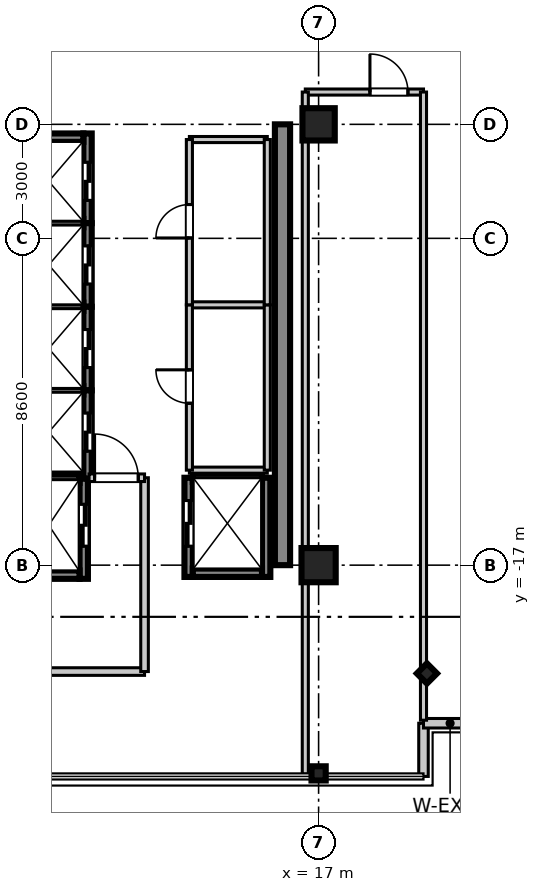
"""IFC4 building model, lengths in metres.
Left out: names, types, materials, properties, quantities, classifications, styles, units other than length and angle.
Written with IfcOpenShell. Run it as: python <this file> out.ifc"""

import sys

from ifc_helpers import new_model, si_unit, direction, frame, frame_2d, origin, origin_2d, place, context, subcontext, project, spatial, rectangle, i_section, extrude, source, transform, mapped, element, fill, save


model = new_model("IFC4")
c1 = context("Model", 3, precision=1e-05, world=origin(), true_north=direction((0.0, 1.0)))
c2 = subcontext(c1, "Body", "Model", "MODEL_VIEW")
j1 = project(units=[si_unit("LENGTHUNIT", "METRE"), si_unit("PLANEANGLEUNIT", "RADIAN")], contexts=[c1])
p1 = place(None, origin())
s1 = spatial("IfcSite", under=j1, at=p1, CompositionType="ELEMENT")
p2 = place(p1, origin())
s2 = spatial("IfcBuilding", under=s1, at=p2, CompositionType="ELEMENT")
p3 = place(p2, frame((0.0, 0.0, 311.9)))
s3 = spatial("IfcBuildingStorey", under=s2, at=p3, CompositionType="ELEMENT", Elevation=311.9)
m1 = source(origin(), c2, "Body", "SweptSolid", [
    extrude(rectangle(XDim=0.9, YDim=0.9, at=origin_2d()), origin(), (0.0, 0.0, 1.0), 3.805),
])
p4 = place(p3, frame((17.0, -17.0, 0.0), z_axis=(0.0, 0.0, 1.0), x_axis=(1.0, 0.0, 0.0)))
e1 = element("IfcColumn", 1, at=p4, inside=s3, PredefinedType="COLUMN", context=c2, shape_type="MappedRepresentation", body=[
    mapped(m1, transform((0.0, 0.0, 0.0), scale=1.0)),
])
m2 = source(origin(), c2, "Body", "SweptSolid", [
    extrude(rectangle(XDim=0.85, YDim=0.85, at=origin_2d()), origin(), (0.0, 0.0, 1.0), 3.805),
])
p5 = place(p3, frame((17.0, -5.4, 0.0), z_axis=(0.0, 0.0, 1.0), x_axis=(1.0, 0.0, 0.0)))
e2 = element("IfcColumn", 2, at=p5, inside=s3, PredefinedType="PILASTER", context=c2, shape_type="MappedRepresentation", body=[
    mapped(m2, transform((0.0, 0.0, 0.0), scale=1.0)),
])
m3 = source(origin(), c2, "Body", "SweptSolid", [
    extrude(i_section(OverallWidth=0.374, OverallDepth=0.374, WebThickness=0.014, FlangeThickness=0.023, at=origin_2d()), origin(), (0.0, 0.0, 1.0), 3.805),
])
for number, where, z_axis, x_axis in (
    (3, (17.0, -22.48, 0.0), (0.0, 0.0, 1.0), (0.0, 1.0, 0.0)),
    (4, (19.85, -19.85, 0.0), (0.0, 0.0, 1.0), (0.707, 0.707, 0.0)),
):
    element("IfcColumn", number, at=place(p3, frame(where, z_axis=z_axis, x_axis=x_axis)), inside=s3, PredefinedType="COLUMN", context=c2, shape_type="MappedRepresentation", body=[
        mapped(m3, transform((0.0, 0.0, 0.0), scale=1.0)),
    ])
m4 = source(origin(), c2, "Body", "SweptSolid", [
    extrude(rectangle(XDim=11.6, YDim=0.4, at=frame_2d((5.8, 0.0))), origin(), (0.0, 0.0, 1.0), 3.55),
])
p6 = place(p3, frame((16.05, -17.0, 0.0), z_axis=(0.0, 0.0, 1.0), x_axis=(0.0, 1.0, 0.0)))
e5 = element("IfcWall", 5, at=p6, inside=s3, PredefinedType="SHEAR", context=c2, shape_type="MappedRepresentation", body=[
    mapped(m4, transform((0.0, 0.0, 0.0), scale=1.0)),
])
m5 = source(origin(), c2, "Body", "SweptSolid", [
    extrude(rectangle(XDim=2.36, YDim=0.22, at=frame_2d((1.18, 0.0))), origin(), (0.0, 0.0, 1.0), 3.55),
])
p7 = place(p3, frame((10.92, -8.0, 0.0), z_axis=(0.0, 0.0, 1.0), x_axis=(0.0, 1.0, 0.0)))
e6 = element("IfcWall", 6, at=p7, inside=s3, PredefinedType="SHEAR", context=c2, shape_type="MappedRepresentation", body=[
    mapped(m5, transform((0.0, 0.0, 0.0), scale=1.0)),
])
p8 = place(p7, frame((0.6, 0.0, 0.0)))
e7 = element("IfcOpeningElement", 7, at=p8, cuts=e6, PredefinedType="OPENING", context=c2, shape_type="SweptSolid", body=[
    extrude(rectangle(XDim=1.0, YDim=2.2, at=frame_2d((0.5, 1.1))), frame((0.0, 0.12, 0.0), z_axis=(0.0, -1.0, 0.0), x_axis=(1.0, 0.0, 0.0)), (0.0, 0.0, 1.0), 0.24),
])
m6 = source(origin(), c2, "Body", "SweptSolid", [
    extrude(rectangle(XDim=1.82, YDim=0.22, at=frame_2d((0.91, 0.0))), origin(), (0.0, 0.0, 1.0), 3.55),
])
p9 = place(p3, frame((8.99, -5.75, 0.0), z_axis=(0.0, 0.0, 1.0), x_axis=(1.0, 0.0, 0.0)))
e8 = element("IfcWall", 8, at=p9, inside=s3, PredefinedType="SHEAR", context=c2, shape_type="MappedRepresentation", body=[
    mapped(m6, transform((0.0, 0.0, 0.0), scale=1.0)),
])
m7 = source(origin(), c2, "Body", "SweptSolid", [
    extrude(rectangle(XDim=2.2, YDim=0.22, at=frame_2d((1.1, 0.0))), origin(), (0.0, 0.0, 1.0), 3.55),
])
p10 = place(p3, frame((10.92, -10.2, 0.0), z_axis=(0.0, 0.0, 1.0), x_axis=(0.0, 1.0, 0.0)))
e9 = element("IfcWall", 9, at=p10, inside=s3, PredefinedType="SHEAR", context=c2, shape_type="MappedRepresentation", body=[
    mapped(m7, transform((0.0, 0.0, 0.0), scale=1.0)),
])
p11 = place(p10, frame((0.6, 0.0, 0.0)))
e10 = element("IfcOpeningElement", 10, at=p11, cuts=e9, PredefinedType="OPENING", context=c2, shape_type="SweptSolid", body=[
    extrude(rectangle(XDim=1.0, YDim=2.2, at=frame_2d((0.5, 1.1))), frame((0.0, 0.12, 0.0), z_axis=(0.0, -1.0, 0.0), x_axis=(1.0, 0.0, 0.0)), (0.0, 0.0, 1.0), 0.24),
])
m8 = source(origin(), c2, "Body", "SweptSolid", [
    extrude(rectangle(XDim=1.82, YDim=0.22, at=frame_2d((0.91, 0.0))), origin(), (0.0, 0.0, 1.0), 3.85),
])
p12 = place(p3, frame((8.99, -8.0, 0.0), z_axis=(0.0, 0.0, 1.0), x_axis=(1.0, 0.0, 0.0)))
e11 = element("IfcWall", 11, at=p12, inside=s3, PredefinedType="SHEAR", context=c2, shape_type="MappedRepresentation", body=[
    mapped(m8, transform((0.0, 0.0, 0.0), scale=1.0)),
])
p13 = place(p3, frame((10.92, -12.4, 0.0), z_axis=(0.0, 0.0, 1.0), x_axis=(0.0, 1.0, 0.0)))
e12 = element("IfcWall", 12, at=p13, inside=s3, PredefinedType="SHEAR", context=c2, shape_type="MappedRepresentation", body=[
    mapped(m7, transform((0.0, 0.0, 0.0), scale=1.0)),
])
p14 = place(p13, frame((0.6, 0.0, 0.0)))
e13 = element("IfcOpeningElement", 13, at=p14, cuts=e12, PredefinedType="OPENING", context=c2, shape_type="SweptSolid", body=[
    extrude(rectangle(XDim=1.0, YDim=2.2, at=frame_2d((0.5, 1.1))), frame((0.0, 0.12, 0.0), z_axis=(0.0, -1.0, 0.0), x_axis=(1.0, 0.0, 0.0)), (0.0, 0.0, 1.0), 0.24),
])
p15 = place(p3, frame((8.99, -10.2, 0.0), z_axis=(0.0, 0.0, 1.0), x_axis=(1.0, 0.0, 0.0)))
e14 = element("IfcWall", 14, at=p15, inside=s3, PredefinedType="SHEAR", context=c2, shape_type="MappedRepresentation", body=[
    mapped(m8, transform((0.0, 0.0, 0.0), scale=1.0)),
])
m9 = source(origin(), c2, "Body", "SweptSolid", [
    extrude(rectangle(XDim=2.325, YDim=0.22, at=frame_2d((1.163, 0.0))), origin(), (0.0, 0.0, 1.0), 3.55),
])
p16 = place(p3, frame((10.92, -14.725, 0.0), z_axis=(0.0, 0.0, 1.0), x_axis=(0.0, 1.0, 0.0)))
e15 = element("IfcWall", 15, at=p16, inside=s3, PredefinedType="SHEAR", context=c2, shape_type="MappedRepresentation", body=[
    mapped(m9, transform((0.0, 0.0, 0.0), scale=1.0)),
])
p17 = place(p16, frame((0.725, 0.0, 0.0)))
e16 = element("IfcOpeningElement", 16, at=p17, cuts=e15, PredefinedType="OPENING", context=c2, shape_type="SweptSolid", body=[
    extrude(rectangle(XDim=1.0, YDim=2.2, at=frame_2d((0.5, 1.1))), frame((0.0, 0.12, 0.0), z_axis=(0.0, -1.0, 0.0), x_axis=(1.0, 0.0, 0.0)), (0.0, 0.0, 1.0), 0.24),
])
p18 = place(p3, frame((8.99, -12.4, 0.0), z_axis=(0.0, 0.0, 1.0), x_axis=(1.0, 0.0, 0.0)))
e17 = element("IfcWall", 17, at=p18, inside=s3, PredefinedType="SHEAR", context=c2, shape_type="MappedRepresentation", body=[
    mapped(m8, transform((0.0, 0.0, 0.0), scale=1.0)),
])
m10 = source(origin(), c2, "Body", "SweptSolid", [
    extrude(rectangle(XDim=2.635, YDim=0.22, at=frame_2d((1.317, 0.0))), origin(), (0.0, 0.0, 1.0), 3.55),
])
p19 = place(p3, frame((10.82, -17.36, 0.0), z_axis=(0.0, 0.0, 1.0), x_axis=(0.0, 1.0, 0.0)))
e18 = element("IfcWall", 18, at=p19, inside=s3, PredefinedType="SHEAR", context=c2, shape_type="MappedRepresentation", body=[
    mapped(m10, transform((0.0, 0.0, 0.0), scale=1.0)),
])
p20 = place(p19, frame((0.86, 0.0, 0.0)))
e19 = element("IfcOpeningElement", 19, at=p20, cuts=e18, PredefinedType="OPENING", context=c2, shape_type="SweptSolid", body=[
    extrude(rectangle(XDim=1.1, YDim=2.2, at=frame_2d((0.55, 1.1))), frame((0.0, 0.12, 0.0), z_axis=(0.0, -1.0, 0.0), x_axis=(1.0, 0.0, 0.0)), (0.0, 0.0, 1.0), 0.24),
])
m11 = source(origin(), c2, "Body", "SweptSolid", [
    extrude(rectangle(XDim=1.62, YDim=0.22, at=frame_2d((0.81, 0.0))), origin(), (0.0, 0.0, 1.0), 3.55),
])
p21 = place(p3, frame((9.09, -17.25, 0.0), z_axis=(0.0, 0.0, 1.0), x_axis=(1.0, 0.0, 0.0)))
e20 = element("IfcWall", 20, at=p21, inside=s3, PredefinedType="SHEAR", context=c2, shape_type="MappedRepresentation", body=[
    mapped(m11, transform((0.0, 0.0, 0.0), scale=1.0)),
])
m12 = source(origin(), c2, "Body", "SweptSolid", [
    extrude(rectangle(XDim=1.62, YDim=0.22, at=frame_2d((0.81, 0.0))), origin(), (0.0, 0.0, 1.0), 3.85),
])
p22 = place(p3, frame((9.09, -14.725, 0.0), z_axis=(0.0, 0.0, 1.0), x_axis=(1.0, 0.0, 0.0)))
e21 = element("IfcWall", 21, at=p22, inside=s3, PredefinedType="SHEAR", context=c2, shape_type="MappedRepresentation", body=[
    mapped(m12, transform((0.0, 0.0, 0.0), scale=1.0)),
])
m13 = source(origin(), c2, "Body", "SweptSolid", [
    extrude(rectangle(XDim=2.61, YDim=0.22, at=frame_2d((1.305, 0.0))), origin(), (0.0, 0.0, 1.0), 3.55),
])
p23 = place(p3, frame((13.58, -17.31, 0.0), z_axis=(0.0, 0.0, 1.0), x_axis=(0.0, 1.0, 0.0)))
e22 = element("IfcWall", 22, at=p23, inside=s3, PredefinedType="SHEAR", context=c2, shape_type="MappedRepresentation", body=[
    mapped(m13, transform((0.0, 0.0, 0.0), scale=1.0)),
])
p24 = place(p23, frame((0.81, 0.0, 0.0)))
e23 = element("IfcOpeningElement", 23, at=p24, cuts=e22, PredefinedType="OPENING", context=c2, shape_type="SweptSolid", body=[
    extrude(rectangle(XDim=1.2, YDim=2.2, at=frame_2d((0.6, 1.1))), frame((0.0, 0.12, 0.0), z_axis=(0.0, -1.0, 0.0), x_axis=(1.0, 0.0, 0.0)), (0.0, 0.0, 1.0), 0.24),
])
p25 = place(p3, frame((15.62, -17.31, 0.0), z_axis=(0.0, 0.0, 1.0), x_axis=(0.0, 1.0, 0.0)))
e24 = element("IfcWall", 24, at=p25, inside=s3, PredefinedType="SHEAR", context=c2, shape_type="MappedRepresentation", body=[
    mapped(m13, transform((0.0, 0.0, 0.0), scale=1.0)),
])
p26 = place(p3, frame((13.69, -17.2, 0.0), z_axis=(0.0, 0.0, 1.0), x_axis=(1.0, 0.0, 0.0)))
e25 = element("IfcWall", 25, at=p26, inside=s3, PredefinedType="SHEAR", context=c2, shape_type="MappedRepresentation", body=[
    mapped(m6, transform((0.0, 0.0, 0.0), scale=1.0)),
])
p27 = place(p3, frame((13.69, -14.7, 0.0), z_axis=(0.0, 0.0, 1.0), x_axis=(1.0, 0.0, 0.0)))
e26 = element("IfcWall", 26, at=p27, inside=s3, PredefinedType="SHEAR", context=c2, shape_type="MappedRepresentation", body=[
    mapped(m8, transform((0.0, 0.0, 0.0), scale=1.0)),
])
m14 = source(origin(), c2, "Body", "SweptSolid", [
    extrude(rectangle(XDim=1.4, YDim=0.25, at=frame_2d((0.7, 0.0))), origin(), (0.0, 0.0, 1.0), 3.55),
])
p28 = place(p3, frame((19.76, -22.56, 0.0), z_axis=(0.0, 0.0, 1.0), x_axis=(0.0, 1.0, 0.0)))
e27 = element("IfcWall", 27, at=p28, inside=s3, PredefinedType="STANDARD", context=c2, shape_type="MappedRepresentation", body=[
    mapped(m14, transform((0.0, 0.0, 0.0), scale=1.0)),
])
m15 = source(origin(), c2, "Body", "SweptSolid", [
    extrude(rectangle(XDim=1.4, YDim=0.25, at=frame_2d((0.7, 0.0))), origin(), (0.0, 0.0, 1.0), 3.55),
])
p29 = place(p3, frame((19.76, -21.16, 0.0), z_axis=(0.0, 0.0, 1.0), x_axis=(1.0, 0.0, 0.0)))
e28 = element("IfcWall", 28, at=p29, inside=s3, PredefinedType="STANDARD", context=c2, shape_type="MappedRepresentation", body=[
    mapped(m15, transform((0.0, 0.0, 0.0), scale=1.0)),
])
m16 = source(origin(), c2, "Body", "SweptSolid", [
    extrude(rectangle(XDim=5.82, YDim=0.2, at=frame_2d((2.91, 0.0))), origin(), (0.0, 0.0, 1.0), 2.89),
])
p30 = place(p3, frame((6.6, -19.8, 0.0), z_axis=(0.0, 0.0, 1.0), x_axis=(1.0, 0.0, 0.0)))
e29 = element("IfcWall", 29, at=p30, inside=s3, PredefinedType="PARTITIONING", context=c2, shape_type="MappedRepresentation", body=[
    mapped(m16, transform((0.0, 0.0, 0.0), scale=1.0)),
])
m17 = source(origin(), c2, "Body", "SweptSolid", [
    extrude(rectangle(XDim=5.1, YDim=0.2, at=frame_2d((2.55, 0.0))), origin(), (0.0, 0.0, 1.0), 2.89),
])
p31 = place(p3, frame((12.42, -19.8, 0.0), z_axis=(0.0, 0.0, 1.0), x_axis=(0.0, 1.0, 0.0)))
e30 = element("IfcWall", 30, at=p31, inside=s3, PredefinedType="PARTITIONING", context=c2, shape_type="MappedRepresentation", body=[
    mapped(m17, transform((0.0, 0.0, 0.0), scale=1.0)),
])
m18 = source(origin(), c2, "Body", "SweptSolid", [
    extrude(rectangle(XDim=1.46, YDim=0.2, at=frame_2d((0.73, 0.0))), origin(), (0.0, 0.0, 1.0), 2.89),
])
p32 = place(p3, frame((10.96, -14.7, 0.0), z_axis=(0.0, 0.0, 1.0), x_axis=(1.0, 0.0, 0.0)))
e31 = element("IfcWall", 31, at=p32, inside=s3, PredefinedType="PARTITIONING", context=c2, shape_type="MappedRepresentation", body=[
    mapped(m18, transform((0.0, 0.0, 0.0), scale=1.0)),
])
p33 = place(p32, frame((0.145, 0.0, 0.0)))
e32 = element("IfcOpeningElement", 32, at=p33, cuts=e31, PredefinedType="OPENING", context=c2, shape_type="SweptSolid", body=[
    extrude(rectangle(XDim=1.15, YDim=2.15, at=frame_2d((0.575, 1.075))), frame((0.0, 0.11, 0.0), z_axis=(0.0, -1.0, 0.0), x_axis=(1.0, 0.0, 0.0)), (0.0, 0.0, 1.0), 0.22),
])
m19 = source(origin(), c2, "Body", "SweptSolid", [
    extrude(rectangle(XDim=2.05, YDim=0.16, at=frame_2d((1.025, 0.0))), origin(), (0.0, 0.0, 1.0), 2.89),
])
for number, where, z_axis, x_axis in (
    (33, (13.6, -14.5, 0.0), (0.0, 0.0, 1.0), (1.0, 0.0, 0.0)),
    (34, (13.6, -10.15, 0.0), (0.0, 0.0, 1.0), (1.0, 0.0, 0.0)),
):
    element("IfcWall", number, at=place(p3, frame(where, z_axis=z_axis, x_axis=x_axis)), inside=s3, PredefinedType="PARTITIONING", context=c2, shape_type="MappedRepresentation", body=[
        mapped(m19, transform((0.0, 0.0, 0.0), scale=1.0)),
    ])
m20 = source(origin(), c2, "Body", "SweptSolid", [
    extrude(rectangle(XDim=4.35, YDim=0.16, at=frame_2d((2.175, 0.0))), origin(), (0.0, 0.0, 1.0), 2.89),
])
p34 = place(p3, frame((13.6, -14.5, 0.0), z_axis=(0.0, 0.0, 1.0), x_axis=(0.0, 1.0, 0.0)))
e35 = element("IfcWall", 35, at=p34, inside=s3, PredefinedType="PARTITIONING", context=c2, shape_type="MappedRepresentation", body=[
    mapped(m20, transform((0.0, 0.0, 0.0), scale=1.0)),
])
p35 = place(p34, frame((1.76, 0.0, 0.0)))
e36 = element("IfcOpeningElement", 36, at=p35, cuts=e35, PredefinedType="OPENING", context=c2, shape_type="SweptSolid", body=[
    extrude(rectangle(XDim=0.88, YDim=2.1, at=frame_2d((0.44, 1.05))), frame((0.0, 0.09, 0.0), z_axis=(0.0, -1.0, 0.0), x_axis=(1.0, 0.0, 0.0)), (0.0, 0.0, 1.0), 0.18),
])
p36 = place(p3, frame((15.65, -14.5, 0.0), z_axis=(0.0, 0.0, 1.0), x_axis=(0.0, 1.0, 0.0)))
e37 = element("IfcWall", 37, at=p36, inside=s3, PredefinedType="PARTITIONING", context=c2, shape_type="MappedRepresentation", body=[
    mapped(m20, transform((0.0, 0.0, 0.0), scale=1.0)),
])
p37 = place(p3, frame((13.6, -5.8, 0.0), z_axis=(0.0, 0.0, 1.0), x_axis=(1.0, 0.0, 0.0)))
e38 = element("IfcWall", 38, at=p37, inside=s3, PredefinedType="PARTITIONING", context=c2, shape_type="MappedRepresentation", body=[
    mapped(m19, transform((0.0, 0.0, 0.0), scale=1.0)),
])
m21 = source(origin(), c2, "Body", "SweptSolid", [
    extrude(rectangle(XDim=4.35, YDim=0.16, at=frame_2d((2.175, 0.0))), origin(), (0.0, 0.0, 1.0), 2.89),
])
p38 = place(p3, frame((13.6, -10.15, 0.0), z_axis=(0.0, 0.0, 1.0), x_axis=(0.0, 1.0, 0.0)))
e39 = element("IfcWall", 39, at=p38, inside=s3, PredefinedType="PARTITIONING", context=c2, shape_type="MappedRepresentation", body=[
    mapped(m21, transform((0.0, 0.0, 0.0), scale=1.0)),
])
p39 = place(p38, frame((1.76, 0.0, 0.0)))
e40 = element("IfcOpeningElement", 40, at=p39, cuts=e39, PredefinedType="OPENING", context=c2, shape_type="SweptSolid", body=[
    extrude(rectangle(XDim=0.88, YDim=2.1, at=frame_2d((0.44, 1.05))), frame((0.0, 0.09, 0.0), z_axis=(0.0, -1.0, 0.0), x_axis=(1.0, 0.0, 0.0)), (0.0, 0.0, 1.0), 0.18),
])
p40 = place(p3, frame((15.65, -10.15, 0.0), z_axis=(0.0, 0.0, 1.0), x_axis=(0.0, 1.0, 0.0)))
e41 = element("IfcWall", 41, at=p40, inside=s3, PredefinedType="PARTITIONING", context=c2, shape_type="MappedRepresentation", body=[
    mapped(m21, transform((0.0, 0.0, 0.0), scale=1.0)),
])
m22 = source(origin(), c2, "Body", "SweptSolid", [
    extrude(rectangle(XDim=3.11, YDim=0.16, at=frame_2d((1.555, 0.0))), origin(), (0.0, 0.0, 1.0), 2.89),
])
p41 = place(p3, frame((16.65, -4.55, 0.0), z_axis=(0.0, 0.0, 1.0), x_axis=(1.0, 0.0, 0.0)))
e42 = element("IfcWall", 42, at=p41, inside=s3, PredefinedType="PARTITIONING", context=c2, shape_type="MappedRepresentation", body=[
    mapped(m22, transform((0.0, 0.0, 0.0), scale=1.0)),
])
p42 = place(p41, frame((1.701, 0.0, 0.0)))
e43 = element("IfcOpeningElement", 43, at=p42, cuts=e42, PredefinedType="OPENING", context=c2, shape_type="SweptSolid", body=[
    extrude(rectangle(XDim=1.0, YDim=2.1, at=frame_2d((0.5, 1.05))), frame((0.0, 0.09, 0.0), z_axis=(0.0, -1.0, 0.0), x_axis=(1.0, 0.0, 0.0)), (0.0, 0.0, 1.0), 0.18),
])
m23 = source(origin(), c2, "Body", "SweptSolid", [
    extrude(rectangle(XDim=17.95, YDim=0.16, at=frame_2d((8.975, 0.0))), origin(), (0.0, 0.0, 1.0), 2.89),
])
p43 = place(p3, frame((16.65, -22.5, 0.0), z_axis=(0.0, 0.0, 1.0), x_axis=(0.0, 1.0, 0.0)))
e44 = element("IfcWall", 44, at=p43, inside=s3, PredefinedType="PARTITIONING", context=c2, shape_type="MappedRepresentation", body=[
    mapped(m23, transform((0.0, 0.0, 0.0), scale=1.0)),
])
m24 = source(origin(), c2, "Body", "SweptSolid", [
    extrude(rectangle(XDim=16.53, YDim=0.16, at=frame_2d((8.265, 0.0))), origin(), (0.0, 0.0, 1.0), 2.89),
])
p44 = place(p3, frame((19.76, -21.08, 0.0), z_axis=(0.0, 0.0, 1.0), x_axis=(0.0, 1.0, 0.0)))
e45 = element("IfcWall", 45, at=p44, inside=s3, PredefinedType="PARTITIONING", context=c2, shape_type="MappedRepresentation", body=[
    mapped(m24, transform((0.0, 0.0, 0.0), scale=1.0)),
])
m25 = source(origin(), c2, "Body", "SweptSolid", [
    extrude(rectangle(XDim=1.0, YDim=2.2, at=frame_2d((0.5, 1.1))), frame((0.0, 0.025, 0.0), z_axis=(0.0, -1.0, 0.0), x_axis=(1.0, 0.0, 0.0)), (0.0, 0.0, 1.0), 0.05),
])
p45 = place(p8, frame((1.0, 0.0, 0.0), z_axis=(0.0, 0.0, 1.0), x_axis=(-1.0, 0.0, 0.0)))
e46 = element("IfcDoor", 46, at=p45, inside=s3, OperationType="DOUBLE_DOOR_SLIDING", PredefinedType="DOOR", context=c2, shape_type="MappedRepresentation", body=[
    mapped(m25, transform((0.0, 0.0, 0.0), scale=1.0)),
])
fill(e7, e46)
p46 = place(p11, frame((1.0, 0.0, 0.0), z_axis=(0.0, 0.0, 1.0), x_axis=(-1.0, 0.0, 0.0)))
e47 = element("IfcDoor", 47, at=p46, inside=s3, OperationType="DOUBLE_DOOR_SLIDING", PredefinedType="DOOR", context=c2, shape_type="MappedRepresentation", body=[
    mapped(m25, transform((0.0, 0.0, 0.0), scale=1.0)),
])
fill(e10, e47)
p47 = place(p14, frame((1.0, 0.0, 0.0), z_axis=(0.0, 0.0, 1.0), x_axis=(-1.0, 0.0, 0.0)))
e48 = element("IfcDoor", 48, at=p47, inside=s3, OperationType="DOUBLE_DOOR_SLIDING", PredefinedType="DOOR", context=c2, shape_type="MappedRepresentation", body=[
    mapped(m25, transform((0.0, 0.0, 0.0), scale=1.0)),
])
fill(e13, e48)
p48 = place(p17, frame((1.0, 0.0, 0.0), z_axis=(0.0, 0.0, 1.0), x_axis=(-1.0, 0.0, 0.0)))
e49 = element("IfcDoor", 49, at=p48, inside=s3, OperationType="DOUBLE_DOOR_SLIDING", PredefinedType="DOOR", context=c2, shape_type="MappedRepresentation", body=[
    mapped(m25, transform((0.0, 0.0, 0.0), scale=1.0)),
])
fill(e16, e49)
m26 = source(origin(), c2, "Body", "SweptSolid", [
    extrude(rectangle(XDim=1.1, YDim=2.2, at=frame_2d((0.55, 1.1))), frame((0.0, 0.025, 0.0), z_axis=(0.0, -1.0, 0.0), x_axis=(1.0, 0.0, 0.0)), (0.0, 0.0, 1.0), 0.05),
])
p49 = place(p20, frame((1.1, 0.0, 0.0), z_axis=(0.0, 0.0, 1.0), x_axis=(-1.0, 0.0, 0.0)))
e50 = element("IfcDoor", 50, at=p49, inside=s3, OperationType="DOUBLE_DOOR_SLIDING", PredefinedType="DOOR", context=c2, shape_type="MappedRepresentation", body=[
    mapped(m26, transform((0.0, 0.0, 0.0), scale=1.0)),
])
fill(e19, e50)
m27 = source(origin(), c2, "Body", "SweptSolid", [
    extrude(rectangle(XDim=1.2, YDim=2.2, at=frame_2d((0.6, 1.1))), frame((0.0, 0.025, 0.0), z_axis=(0.0, -1.0, 0.0), x_axis=(1.0, 0.0, 0.0)), (0.0, 0.0, 1.0), 0.05),
])
p50 = place(p24, origin())
e51 = element("IfcDoor", 51, at=p50, inside=s3, OperationType="DOUBLE_DOOR_SLIDING", PredefinedType="DOOR", context=c2, shape_type="MappedRepresentation", body=[
    mapped(m27, transform((0.0, 0.0, 0.0), scale=1.0)),
])
fill(e23, e51)
m28 = source(origin(), c2, "Body", "SweptSolid", [
    extrude(rectangle(XDim=1.15, YDim=2.15, at=frame_2d((0.575, 1.075))), frame((0.0, 0.025, 0.0), z_axis=(0.0, -1.0, 0.0), x_axis=(1.0, 0.0, 0.0)), (0.0, 0.0, 1.0), 0.05),
])
p51 = place(p33, origin())
e52 = element("IfcDoor", 52, at=p51, inside=s3, OperationType="SINGLE_SWING_LEFT", PredefinedType="DOOR", context=c2, shape_type="MappedRepresentation", body=[
    mapped(m28, transform((0.0, 0.0, 0.0), scale=1.0)),
])
fill(e32, e52)
m29 = source(origin(), c2, "Body", "SweptSolid", [
    extrude(rectangle(XDim=0.88, YDim=2.1, at=frame_2d((0.44, 1.05))), frame((0.0, 0.025, 0.0), z_axis=(0.0, -1.0, 0.0), x_axis=(1.0, 0.0, 0.0)), (0.0, 0.0, 1.0), 0.05),
])
p52 = place(p35, frame((0.88, 0.0, 0.0), z_axis=(0.0, 0.0, 1.0), x_axis=(-1.0, 0.0, 0.0)))
e53 = element("IfcDoor", 53, at=p52, inside=s3, OperationType="SINGLE_SWING_RIGHT", PredefinedType="DOOR", context=c2, shape_type="MappedRepresentation", body=[
    mapped(m29, transform((0.0, 0.0, 0.0), scale=1.0)),
])
fill(e36, e53)
p53 = place(p39, frame((0.88, 0.0, 0.0), z_axis=(0.0, 0.0, 1.0), x_axis=(-1.0, 0.0, 0.0)))
e54 = element("IfcDoor", 54, at=p53, inside=s3, OperationType="SINGLE_SWING_LEFT", PredefinedType="DOOR", context=c2, shape_type="MappedRepresentation", body=[
    mapped(m29, transform((0.0, 0.0, 0.0), scale=1.0)),
])
fill(e40, e54)
m30 = source(origin(), c2, "Body", "SweptSolid", [
    extrude(rectangle(XDim=1.0, YDim=2.1, at=frame_2d((0.5, 1.05))), frame((0.0, 0.025, 0.0), z_axis=(0.0, -1.0, 0.0), x_axis=(1.0, 0.0, 0.0)), (0.0, 0.0, 1.0), 0.05),
])
p54 = place(p42, frame((1.0, 0.0, 0.0), z_axis=(0.0, 0.0, 1.0), x_axis=(-1.0, 0.0, 0.0)))
e55 = element("IfcDoor", 55, at=p54, inside=s3, OperationType="SINGLE_SWING_LEFT", PredefinedType="DOOR", context=c2, shape_type="MappedRepresentation", body=[
    mapped(m30, transform((0.0, 0.0, 0.0), scale=1.0)),
])
fill(e43, e55)
save(model, sys.argv[1])
